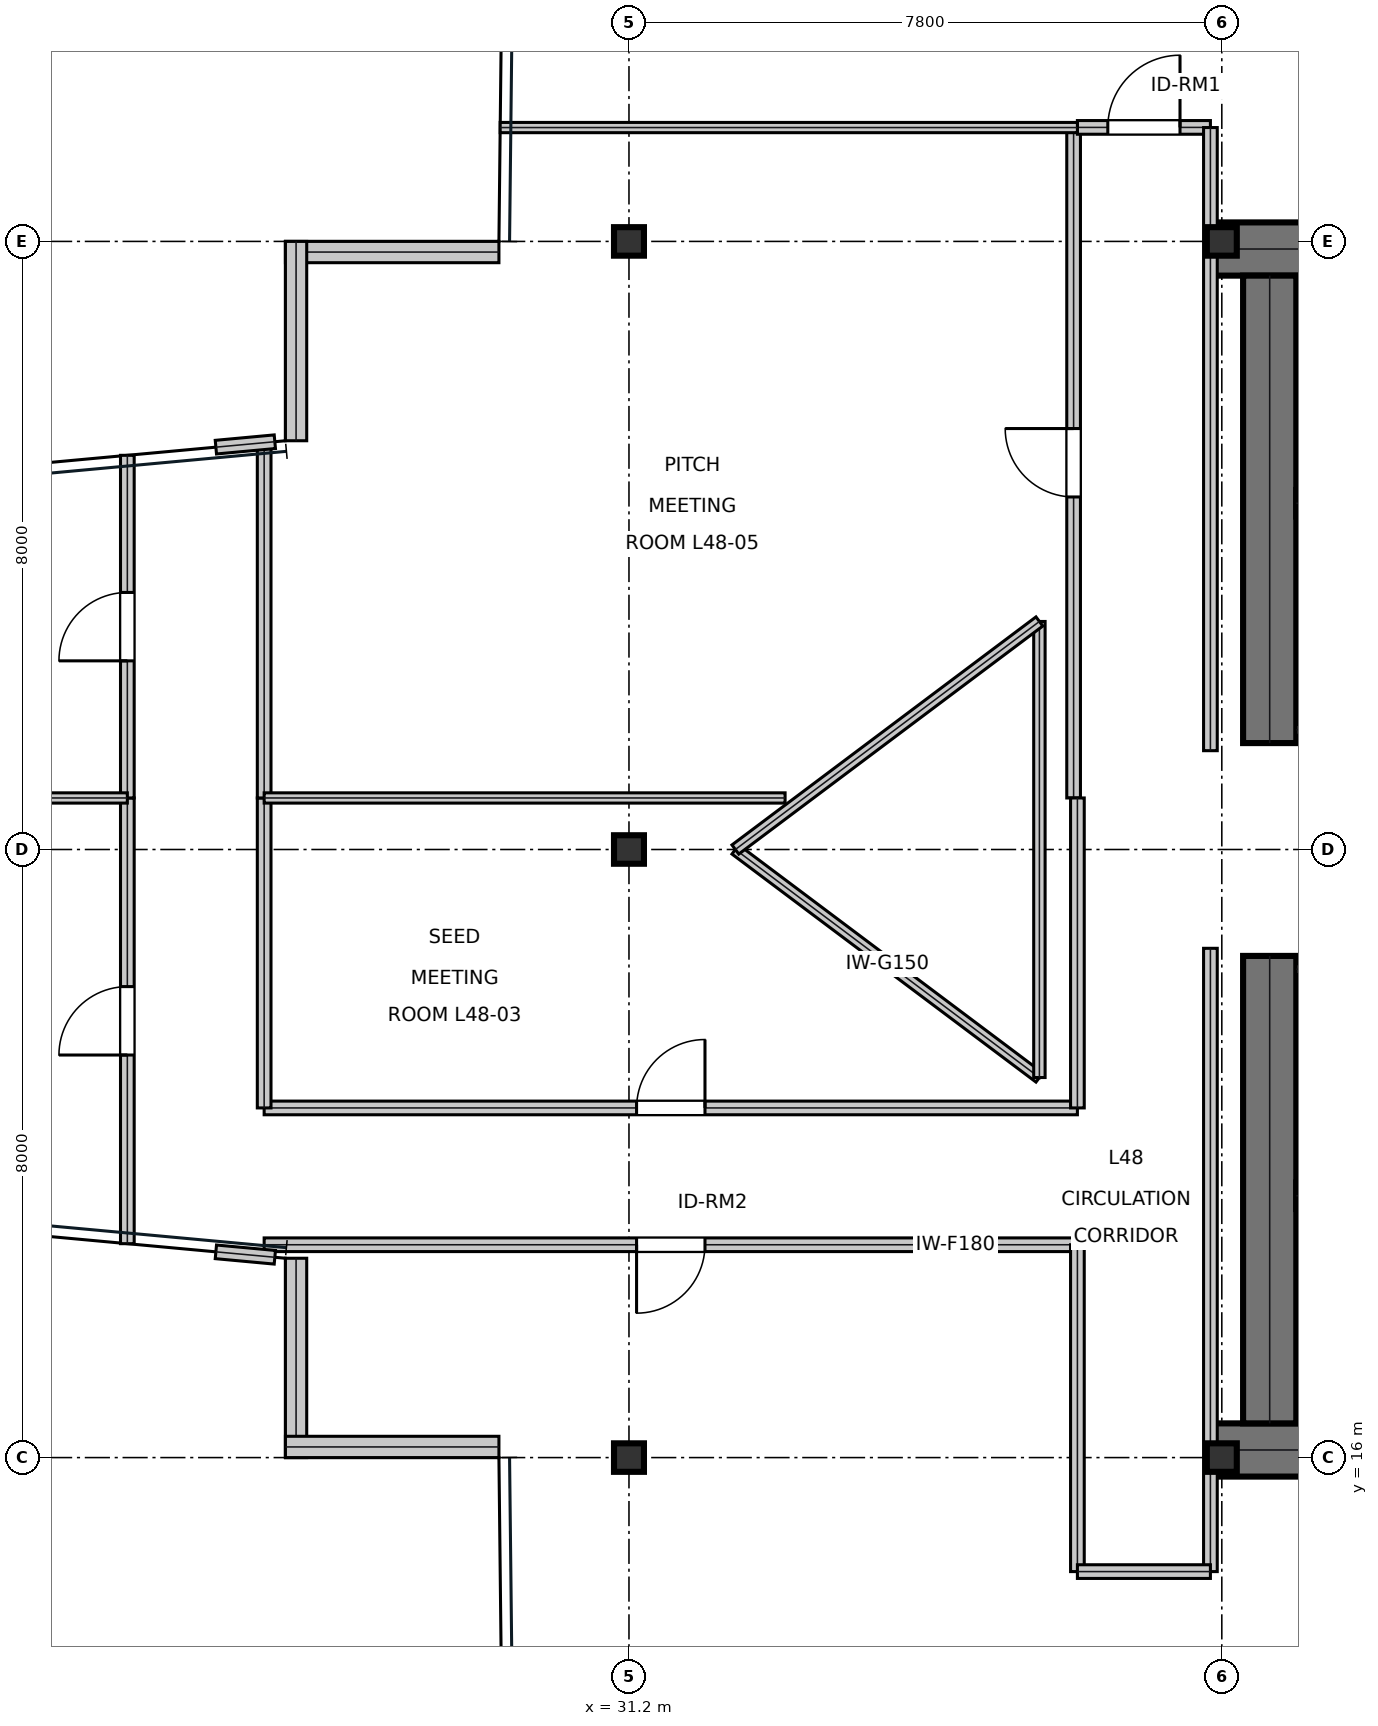
"""IFC4 building model, lengths in metres.
Left out: names, types, materials, properties, quantities, classifications, styles, units other than length and angle.
Written with IfcOpenShell. Run it as: python <this file> out.ifc"""

import sys

from ifc_helpers import new_model, si_unit, direction, frame, frame_2d, origin, origin_2d, place, context, subcontext, project, spatial, rectangle, i_section, extrude, element, fill, save


model = new_model("IFC4")
c1 = context("Model", 3, precision=1e-05, world=origin(), true_north=direction((0.0, 1.0)))
c2 = subcontext(c1, "Body", "Model", "MODEL_VIEW")
j1 = project(units=[si_unit("LENGTHUNIT", "METRE"), si_unit("PLANEANGLEUNIT", "RADIAN")], contexts=[c1])
p1 = place(None, origin())
s1 = spatial("IfcSite", under=j1, at=p1, CompositionType="ELEMENT")
p2 = place(p1, origin())
s2 = spatial("IfcBuilding", under=s1, at=p2, CompositionType="ELEMENT")
p3 = place(p2, frame((0.0, 0.0, 208.05)))
s3 = spatial("IfcBuildingStorey", under=s2, at=p3, CompositionType="ELEMENT", Elevation=208.05)
for number, where, z_axis, x_axis in (
    (1, (38.8, 31.9, 0.0), (0.0, 0.0, 1.0), (1.0, 0.0, 0.0)),
    (2, (38.8, 16.1, 0.0), (0.0, 0.0, 1.0), (1.0, 0.0, 0.0)),
):
    element("IfcWall", number, at=place(p3, frame(where, z_axis=z_axis, x_axis=x_axis)), inside=s3, PredefinedType="SHEAR", context=c2, shape_type="SweptSolid", body=[
        extrude(rectangle(XDim=16.0, YDim=0.7, at=frame_2d((8.0, 0.0))), origin(), (0.0, 0.0, 1.0), 3.79),
    ])
for number, where, z_axis, x_axis in (
    (3, (39.63, 16.45, 0.0), (0.0, 0.0, 1.0), (0.0, 1.0, 0.0)),
    (4, (39.63, 25.4, 0.0), (0.0, 0.0, 1.0), (0.0, 1.0, 0.0)),
):
    element("IfcWall", number, at=place(p3, frame(where, z_axis=z_axis, x_axis=x_axis)), inside=s3, PredefinedType="SHEAR", context=c2, shape_type="SweptSolid", body=[
        extrude(rectangle(XDim=6.15, YDim=0.7, at=frame_2d((3.075, 0.0))), origin(), (0.0, 0.0, 1.0), 3.79),
    ])
p4 = place(p3, frame((39.98, 28.555, 0.0), z_axis=(0.0, 0.0, 1.0), x_axis=(1.0, 0.0, 0.0)))
e5 = element("IfcWall", 5, at=p4, inside=s3, PredefinedType="SHEAR", context=c2, shape_type="SweptSolid", body=[
    extrude(rectangle(XDim=7.71, YDim=0.35, at=frame_2d((3.855, 0.0))), origin(), (0.0, 0.0, 1.0), 3.79),
])
p5 = place(p4, frame((0.25, 0.0, 0.0)))
e6 = element("IfcOpeningElement", 6, at=p5, cuts=e5, PredefinedType="OPENING", context=c2, shape_type="SweptSolid", body=[
    extrude(rectangle(XDim=1.1, YDim=2.15, at=frame_2d((0.55, 1.075))), frame((0.0, 0.185, 0.0), z_axis=(0.0, -1.0, 0.0), x_axis=(1.0, 0.0, 0.0)), (0.0, 0.0, 1.0), 0.37),
])
p6 = place(p3, frame((39.98, 19.445, 0.0), z_axis=(0.0, 0.0, 1.0), x_axis=(1.0, 0.0, 0.0)))
e7 = element("IfcWall", 7, at=p6, inside=s3, PredefinedType="SHEAR", context=c2, shape_type="SweptSolid", body=[
    extrude(rectangle(XDim=7.71, YDim=0.35, at=frame_2d((3.855, 0.0))), origin(), (0.0, 0.0, 1.0), 3.79),
])
p7 = place(p6, frame((0.25, 0.0, 0.0)))
e8 = element("IfcOpeningElement", 8, at=p7, cuts=e7, PredefinedType="OPENING", context=c2, shape_type="SweptSolid", body=[
    extrude(rectangle(XDim=1.1, YDim=2.15, at=frame_2d((0.55, 1.075))), frame((0.0, 0.185, 0.0), z_axis=(0.0, -1.0, 0.0), x_axis=(1.0, 0.0, 0.0)), (0.0, 0.0, 1.0), 0.37),
])
for number, where, z_axis, x_axis in (
    (9, (31.2, 16.0, 0.0), (0.0, 0.0, 1.0), (1.0, 0.0, 0.0)),
    (10, (31.2, 24.0, 0.0), (0.0, 0.0, 1.0), (1.0, 0.0, 0.0)),
    (11, (31.2, 32.0, 0.0), (0.0, 0.0, 1.0), (1.0, 0.0, 0.0)),
    (12, (39.0, 16.0, 0.0), (0.0, 0.0, 1.0), (1.0, 0.0, 0.0)),
    (13, (39.0, 32.0, 0.0), (0.0, 0.0, 1.0), (1.0, 0.0, 0.0)),
):
    element("IfcColumn", number, at=place(p3, frame(where, z_axis=z_axis, x_axis=x_axis)), inside=s3, PredefinedType="COLUMN", context=c2, shape_type="SweptSolid", body=[
        extrude(i_section(OverallWidth=0.394, OverallDepth=0.375, WebThickness=0.017, FlangeThickness=0.028, at=origin_2d()), origin(), (0.0, 0.0, 1.0), 4.044),
    ])
p8 = place(p3, frame((29.489, 31.86, 0.0), z_axis=(0.0, 0.0, 1.0), x_axis=(-1.0, 0.0, 0.0)))
e14 = element("IfcWall", 14, at=p8, inside=s3, PredefinedType="STANDARD", context=c2, shape_type="SweptSolid", body=[
    extrude(rectangle(XDim=2.809, YDim=0.28, at=frame_2d((1.405, 0.0))), origin(), (0.0, 0.0, 1.0), 3.79),
])
for number, where, z_axis, x_axis in (
    (15, (26.82, 32.0, 0.0), (0.0, 0.0, 1.0), (0.0, -1.0, 0.0)),
    (16, (26.82, 18.622, 0.0), (0.0, 0.0, 1.0), (0.0, -1.0, 0.0)),
):
    element("IfcWall", number, at=place(p3, frame(where, z_axis=z_axis, x_axis=x_axis)), inside=s3, PredefinedType="STANDARD", context=c2, shape_type="SweptSolid", body=[
        extrude(rectangle(XDim=2.622, YDim=0.28, at=frame_2d((1.311, 0.0))), origin(), (0.0, 0.0, 1.0), 3.319),
    ])
p9 = place(p3, frame((26.68, 16.14, 0.0), z_axis=(0.0, 0.0, 1.0), x_axis=(1.0, 0.0, 0.0)))
e17 = element("IfcWall", 17, at=p9, inside=s3, PredefinedType="STANDARD", context=c2, shape_type="SweptSolid", body=[
    extrude(rectangle(XDim=2.809, YDim=0.28, at=frame_2d((1.405, 0.0))), origin(), (0.0, 0.0, 1.0), 3.79),
])
p10 = place(p3, frame((39.98, 25.575, 0.0), z_axis=(0.0, 0.0, 1.0), x_axis=(1.0, 0.0, 0.0)))
e18 = element("IfcWall", 18, at=p10, inside=s3, PredefinedType="PARTITIONING", context=c2, shape_type="SweptSolid", body=[
    extrude(rectangle(XDim=5.9, YDim=0.15, at=frame_2d((2.95, 0.0))), origin(), (0.0, 0.0, 1.0), 3.79),
])
p11 = place(p10, frame((2.35, 0.0, 0.0)))
e19 = element("IfcOpeningElement", 19, at=p11, cuts=e18, PredefinedType="OPENING", context=c2, shape_type="SweptSolid", body=[
    extrude(rectangle(XDim=1.05, YDim=2.15, at=frame_2d((0.525, 1.075))), frame((0.0, 0.085, 0.0), z_axis=(0.0, -1.0, 0.0), x_axis=(1.0, 0.0, 0.0)), (0.0, 0.0, 1.0), 0.17),
])
p12 = place(p3, frame((39.98, 22.425, 0.0), z_axis=(0.0, 0.0, 1.0), x_axis=(1.0, 0.0, 0.0)))
e20 = element("IfcWall", 20, at=p12, inside=s3, PredefinedType="PARTITIONING", context=c2, shape_type="SweptSolid", body=[
    extrude(rectangle(XDim=5.9, YDim=0.15, at=frame_2d((2.95, 0.0))), origin(), (0.0, 0.0, 1.0), 3.79),
])
p13 = place(p12, frame((2.35, 0.0, 0.0)))
e21 = element("IfcOpeningElement", 21, at=p13, cuts=e20, PredefinedType="OPENING", context=c2, shape_type="SweptSolid", body=[
    extrude(rectangle(XDim=1.05, YDim=2.15, at=frame_2d((0.525, 1.075))), frame((0.0, 0.085, 0.0), z_axis=(0.0, -1.0, 0.0), x_axis=(1.0, 0.0, 0.0)), (0.0, 0.0, 1.0), 0.17),
])
p14 = place(p3, frame((26.4, 18.8, 0.0), z_axis=(0.0, 0.0, 1.0), x_axis=(1.0, 0.0, 0.0)))
e22 = element("IfcWall", 22, at=p14, inside=s3, PredefinedType="SOLIDWALL", context=c2, shape_type="SweptSolid", body=[
    extrude(rectangle(XDim=10.7, YDim=0.18, at=frame_2d((5.35, 0.0))), origin(), (0.0, 0.0, 1.0), 3.241),
])
p15 = place(p14, frame((4.9, 0.0, 0.0)))
e23 = element("IfcOpeningElement", 23, at=p15, cuts=e22, PredefinedType="OPENING", context=c2, shape_type="SweptSolid", body=[
    extrude(rectangle(XDim=0.9, YDim=2.15, at=frame_2d((0.45, 1.075))), frame((0.0, 0.1, 0.0), z_axis=(0.0, -1.0, 0.0), x_axis=(1.0, 0.0, 0.0)), (0.0, 0.0, 1.0), 0.2),
])
p16 = place(p3, frame((24.6, 18.814, 0.0), z_axis=(0.0, 0.0, 1.0), x_axis=(0.0, 1.0, 0.0)))
e24 = element("IfcWall", 24, at=p16, inside=s3, PredefinedType="SOLIDWALL", context=c2, shape_type="SweptSolid", body=[
    extrude(rectangle(XDim=5.864, YDim=0.18, at=frame_2d((2.932, 0.0))), origin(), (0.0, 0.0, 1.0), 3.241),
])
p17 = place(p16, frame((2.482, 0.0, 0.0)))
e25 = element("IfcOpeningElement", 25, at=p17, cuts=e24, PredefinedType="OPENING", context=c2, shape_type="SweptSolid", body=[
    extrude(rectangle(XDim=0.9, YDim=2.15, at=frame_2d((0.45, 1.075))), frame((0.0, 0.1, 0.0), z_axis=(0.0, -1.0, 0.0), x_axis=(1.0, 0.0, 0.0)), (0.0, 0.0, 1.0), 0.2),
])
p18 = place(p3, frame((26.4, 20.6, 0.0), z_axis=(0.0, 0.0, 1.0), x_axis=(1.0, 0.0, 0.0)))
e26 = element("IfcWall", 26, at=p18, inside=s3, PredefinedType="SOLIDWALL", context=c2, shape_type="SweptSolid", body=[
    extrude(rectangle(XDim=10.7, YDim=0.18, at=frame_2d((5.35, 0.0))), origin(), (0.0, 0.0, 1.0), 3.241),
])
p19 = place(p18, frame((4.9, 0.0, 0.0)))
e27 = element("IfcOpeningElement", 27, at=p19, cuts=e26, PredefinedType="OPENING", context=c2, shape_type="SweptSolid", body=[
    extrude(rectangle(XDim=0.9, YDim=2.15, at=frame_2d((0.45, 1.075))), frame((0.0, 0.1, 0.0), z_axis=(0.0, -1.0, 0.0), x_axis=(1.0, 0.0, 0.0)), (0.0, 0.0, 1.0), 0.2),
])
p20 = place(p3, frame((24.6, 24.678, 0.0), z_axis=(0.0, 0.0, 1.0), x_axis=(0.0, 1.0, 0.0)))
e28 = element("IfcWall", 28, at=p20, inside=s3, PredefinedType="SOLIDWALL", context=c2, shape_type="SweptSolid", body=[
    extrude(rectangle(XDim=4.508, YDim=0.18, at=frame_2d((2.254, 0.0))), origin(), (0.0, 0.0, 1.0), 3.241),
])
p21 = place(p20, frame((1.804, 0.0, 0.0)))
e29 = element("IfcOpeningElement", 29, at=p21, cuts=e28, PredefinedType="OPENING", context=c2, shape_type="SweptSolid", body=[
    extrude(rectangle(XDim=0.9, YDim=2.15, at=frame_2d((0.45, 1.075))), frame((0.0, 0.1, 0.0), z_axis=(0.0, -1.0, 0.0), x_axis=(1.0, 0.0, 0.0)), (0.0, 0.0, 1.0), 0.2),
])
p22 = place(p3, frame((37.05, 24.678, 0.0), z_axis=(0.0, 0.0, 1.0), x_axis=(0.0, 1.0, 0.0)))
e30 = element("IfcWall", 30, at=p22, inside=s3, PredefinedType="SOLIDWALL", context=c2, shape_type="SweptSolid", body=[
    extrude(rectangle(XDim=8.82, YDim=0.18, at=frame_2d((4.41, 0.0))), origin(), (0.0, 0.0, 1.0), 3.241),
])
p23 = place(p22, frame((3.96, 0.0, 0.0)))
e31 = element("IfcOpeningElement", 31, at=p23, cuts=e30, PredefinedType="OPENING", context=c2, shape_type="SweptSolid", body=[
    extrude(rectangle(XDim=0.9, YDim=2.15, at=frame_2d((0.45, 1.075))), frame((0.0, 0.1, 0.0), z_axis=(0.0, -1.0, 0.0), x_axis=(1.0, 0.0, 0.0)), (0.0, 0.0, 1.0), 0.2),
])
p24 = place(p3, frame((37.1, 33.5, 0.0), z_axis=(0.0, 0.0, 1.0), x_axis=(1.0, 0.0, 0.0)))
e32 = element("IfcWall", 32, at=p24, inside=s3, PredefinedType="SOLIDWALL", context=c2, shape_type="SweptSolid", body=[
    extrude(rectangle(XDim=1.75, YDim=0.18, at=frame_2d((0.875, 0.0))), origin(), (0.0, 0.0, 1.0), 3.241),
])
p25 = place(p24, frame((0.4, 0.0, 0.0)))
e33 = element("IfcOpeningElement", 33, at=p25, cuts=e32, PredefinedType="OPENING", context=c2, shape_type="SweptSolid", body=[
    extrude(rectangle(XDim=0.95, YDim=2.15, at=frame_2d((0.475, 1.075))), frame((0.0, 0.1, 0.0), z_axis=(0.0, -1.0, 0.0), x_axis=(1.0, 0.0, 0.0)), (0.0, 0.0, 1.0), 0.2),
])
p26 = place(p3, frame((38.85, 14.5, 0.0), z_axis=(0.0, 0.0, 1.0), x_axis=(0.0, 1.0, 0.0)))
e34 = element("IfcWall", 34, at=p26, inside=s3, PredefinedType="SOLIDWALL", context=c2, shape_type="SweptSolid", body=[
    extrude(rectangle(XDim=8.2, YDim=0.18, at=frame_2d((4.1, 0.0))), origin(), (0.0, 0.0, 1.0), 3.241),
])
p27 = place(p3, frame((37.1, 14.5, 0.0), z_axis=(0.0, 0.0, 1.0), x_axis=(0.0, 1.0, 0.0)))
e35 = element("IfcWall", 35, at=p27, inside=s3, PredefinedType="SOLIDWALL", context=c2, shape_type="SweptSolid", body=[
    extrude(rectangle(XDim=4.3, YDim=0.18, at=frame_2d((2.15, 0.0))), origin(), (0.0, 0.0, 1.0), 3.241),
])
p28 = place(p3, frame((37.1, 14.5, 0.0), z_axis=(0.0, 0.0, 1.0), x_axis=(1.0, 0.0, 0.0)))
e36 = element("IfcWall", 36, at=p28, inside=s3, PredefinedType="SOLIDWALL", context=c2, shape_type="SweptSolid", body=[
    extrude(rectangle(XDim=1.75, YDim=0.18, at=frame_2d((0.875, 0.0))), origin(), (0.0, 0.0, 1.0), 3.241),
])
p29 = place(p3, frame((25.765, 18.707, 0.0), z_axis=(0.0, 0.0, 1.0), x_axis=(0.995774178655, -0.091835641909, 0.0)))
e37 = element("IfcWall", 37, at=p29, inside=s3, PredefinedType="SOLIDWALL", context=c2, shape_type="SweptSolid", body=[
    extrude(rectangle(XDim=0.779, YDim=0.18, at=frame_2d((0.389, 0.0))), origin(), (0.0, 0.0, 1.0), 3.79),
])
p30 = place(p3, frame((26.4, 20.6, 0.0), z_axis=(0.0, 0.0, 1.0), x_axis=(0.0, 1.0, 0.0)))
e38 = element("IfcWall", 38, at=p30, inside=s3, PredefinedType="SOLIDWALL", context=c2, shape_type="SweptSolid", body=[
    extrude(rectangle(XDim=4.078, YDim=0.18, at=frame_2d((2.039, 0.0))), origin(), (0.0, 0.0, 1.0), 3.241),
])
p31 = place(p3, frame((37.1, 20.6, 0.0), z_axis=(0.0, 0.0, 1.0), x_axis=(0.0, 1.0, 0.0)))
e39 = element("IfcWall", 39, at=p31, inside=s3, PredefinedType="SOLIDWALL", context=c2, shape_type="SweptSolid", body=[
    extrude(rectangle(XDim=4.078, YDim=0.18, at=frame_2d((2.039, 0.0))), origin(), (0.0, 0.0, 1.0), 3.79),
])
p32 = place(p3, frame((26.4, 24.678, 0.0), z_axis=(0.0, 0.0, 1.0), x_axis=(0.0, 1.0, 0.0)))
e40 = element("IfcWall", 40, at=p32, inside=s3, PredefinedType="SOLIDWALL", context=c2, shape_type="SweptSolid", body=[
    extrude(rectangle(XDim=4.674, YDim=0.18, at=frame_2d((2.337, 0.0))), origin(), (0.0, 0.0, 1.0), 3.241),
])
p33 = place(p3, frame((25.765, 29.293, 0.0), z_axis=(0.0, 0.0, 1.0), x_axis=(0.995774178655, 0.091835641909, 0.0)))
e41 = element("IfcWall", 41, at=p33, inside=s3, PredefinedType="SOLIDWALL", context=c2, shape_type="SweptSolid", body=[
    extrude(rectangle(XDim=0.779, YDim=0.18, at=frame_2d((0.389, 0.0))), origin(), (0.0, 0.0, 1.0), 3.79),
])
p34 = place(p3, frame((38.85, 25.3, 0.0), z_axis=(0.0, 0.0, 1.0), x_axis=(0.0, 1.0, 0.0)))
e42 = element("IfcWall", 42, at=p34, inside=s3, PredefinedType="SOLIDWALL", context=c2, shape_type="SweptSolid", body=[
    extrude(rectangle(XDim=8.198, YDim=0.18, at=frame_2d((4.099, 0.0))), origin(), (0.0, 0.0, 1.0), 3.241),
])
p35 = place(p3, frame((12.991, 24.678, 0.0), z_axis=(0.0, 0.0, 1.0), x_axis=(1.0, 0.0, 0.0)))
e43 = element("IfcWall", 43, at=p35, inside=s3, PredefinedType="PARTITIONING", context=c2, shape_type="SweptSolid", body=[
    extrude(rectangle(XDim=11.609, YDim=0.135, at=frame_2d((5.805, 0.0))), origin(), (0.0, 0.0, 1.0), 3.319),
])
p36 = place(p3, frame((26.4, 24.678, 0.0), z_axis=(0.0, 0.0, 1.0), x_axis=(1.0, 0.0, 0.0)))
e44 = element("IfcWall", 44, at=p36, inside=s3, PredefinedType="PARTITIONING", context=c2, shape_type="SweptSolid", body=[
    extrude(rectangle(XDim=6.854, YDim=0.135, at=frame_2d((3.427, 0.0))), origin(), (0.0, 0.0, 1.0), 3.241),
])
p37 = place(p3, frame((29.506, 33.498, 0.0), z_axis=(0.0, 0.0, 1.0), x_axis=(1.0, 0.0, 0.0)))
e45 = element("IfcWall", 45, at=p37, inside=s3, PredefinedType="PARTITIONING", context=c2, shape_type="SweptSolid", body=[
    extrude(rectangle(XDim=7.594, YDim=0.135, at=frame_2d((3.797, 0.0))), origin(), (0.0, 0.0, 1.0), 3.319),
])
p38 = place(p3, frame((32.6, 24.0, 0.0), z_axis=(0.0, 0.0, 1.0), x_axis=(0.8, -0.6, 0.0)))
e46 = element("IfcWall", 46, at=p38, inside=s3, PredefinedType="MOVABLE", context=c2, shape_type="SweptSolid", body=[
    extrude(rectangle(XDim=5.0, YDim=0.15, at=frame_2d((2.5, 0.0))), origin(), (0.0, 0.0, 1.0), 3.79),
])
p39 = place(p3, frame((36.6, 21.0, 0.0), z_axis=(0.0, 0.0, 1.0), x_axis=(0.0, 1.0, 0.0)))
e47 = element("IfcWall", 47, at=p39, inside=s3, PredefinedType="MOVABLE", context=c2, shape_type="SweptSolid", body=[
    extrude(rectangle(XDim=6.0, YDim=0.15, at=frame_2d((3.0, 0.0))), origin(), (0.0, 0.0, 1.0), 3.79),
])
p40 = place(p3, frame((36.6, 27.0, 0.0), z_axis=(0.0, 0.0, 1.0), x_axis=(-0.8, -0.6, 0.0)))
e48 = element("IfcWall", 48, at=p40, inside=s3, PredefinedType="MOVABLE", context=c2, shape_type="SweptSolid", body=[
    extrude(rectangle(XDim=5.0, YDim=0.15, at=frame_2d((2.5, 0.0))), origin(), (0.0, 0.0, 1.0), 3.79),
])
p41 = place(p15, frame((0.9, 0.0, 0.0), z_axis=(0.0, 0.0, 1.0), x_axis=(-1.0, 0.0, 0.0)))
e49 = element("IfcDoor", 49, at=p41, inside=s3, OperationType="SINGLE_SWING_RIGHT", PredefinedType="DOOR", context=c2, shape_type="SweptSolid", body=[
    extrude(rectangle(XDim=0.9, YDim=2.15, at=frame_2d((0.45, 1.075))), frame((0.0, 0.025, 0.0), z_axis=(0.0, -1.0, 0.0), x_axis=(1.0, 0.0, 0.0)), (0.0, 0.0, 1.0), 0.05),
])
fill(e23, e49)
p42 = place(p17, origin())
e50 = element("IfcDoor", 50, at=p42, inside=s3, OperationType="SINGLE_SWING_LEFT", PredefinedType="DOOR", context=c2, shape_type="SweptSolid", body=[
    extrude(rectangle(XDim=0.9, YDim=2.15, at=frame_2d((0.45, 1.075))), frame((0.0, 0.025, 0.0), z_axis=(0.0, -1.0, 0.0), x_axis=(1.0, 0.0, 0.0)), (0.0, 0.0, 1.0), 0.05),
])
fill(e25, e50)
p43 = place(p19, origin())
e51 = element("IfcDoor", 51, at=p43, inside=s3, OperationType="SINGLE_SWING_RIGHT", PredefinedType="DOOR", context=c2, shape_type="SweptSolid", body=[
    extrude(rectangle(XDim=0.9, YDim=2.15, at=frame_2d((0.45, 1.075))), frame((0.0, 0.025, 0.0), z_axis=(0.0, -1.0, 0.0), x_axis=(1.0, 0.0, 0.0)), (0.0, 0.0, 1.0), 0.05),
])
fill(e27, e51)
p44 = place(p21, origin())
e52 = element("IfcDoor", 52, at=p44, inside=s3, OperationType="SINGLE_SWING_LEFT", PredefinedType="DOOR", context=c2, shape_type="SweptSolid", body=[
    extrude(rectangle(XDim=0.9, YDim=2.15, at=frame_2d((0.45, 1.075))), frame((0.0, 0.025, 0.0), z_axis=(0.0, -1.0, 0.0), x_axis=(1.0, 0.0, 0.0)), (0.0, 0.0, 1.0), 0.05),
])
fill(e29, e52)
p45 = place(p23, origin())
e53 = element("IfcDoor", 53, at=p45, inside=s3, OperationType="SINGLE_SWING_RIGHT", PredefinedType="DOOR", context=c2, shape_type="SweptSolid", body=[
    extrude(rectangle(XDim=0.9, YDim=2.15, at=frame_2d((0.45, 1.075))), frame((0.0, 0.025, 0.0), z_axis=(0.0, -1.0, 0.0), x_axis=(1.0, 0.0, 0.0)), (0.0, 0.0, 1.0), 0.05),
])
fill(e31, e53)
p46 = place(p25, origin())
e54 = element("IfcDoor", 54, at=p46, inside=s3, OperationType="SINGLE_SWING_RIGHT", PredefinedType="DOOR", context=c2, shape_type="SweptSolid", body=[
    extrude(rectangle(XDim=0.95, YDim=2.15, at=frame_2d((0.475, 1.075))), frame((0.0, 0.025, 0.0), z_axis=(0.0, -1.0, 0.0), x_axis=(1.0, 0.0, 0.0)), (0.0, 0.0, 1.0), 0.05),
])
fill(e33, e54)
save(model, sys.argv[1])
